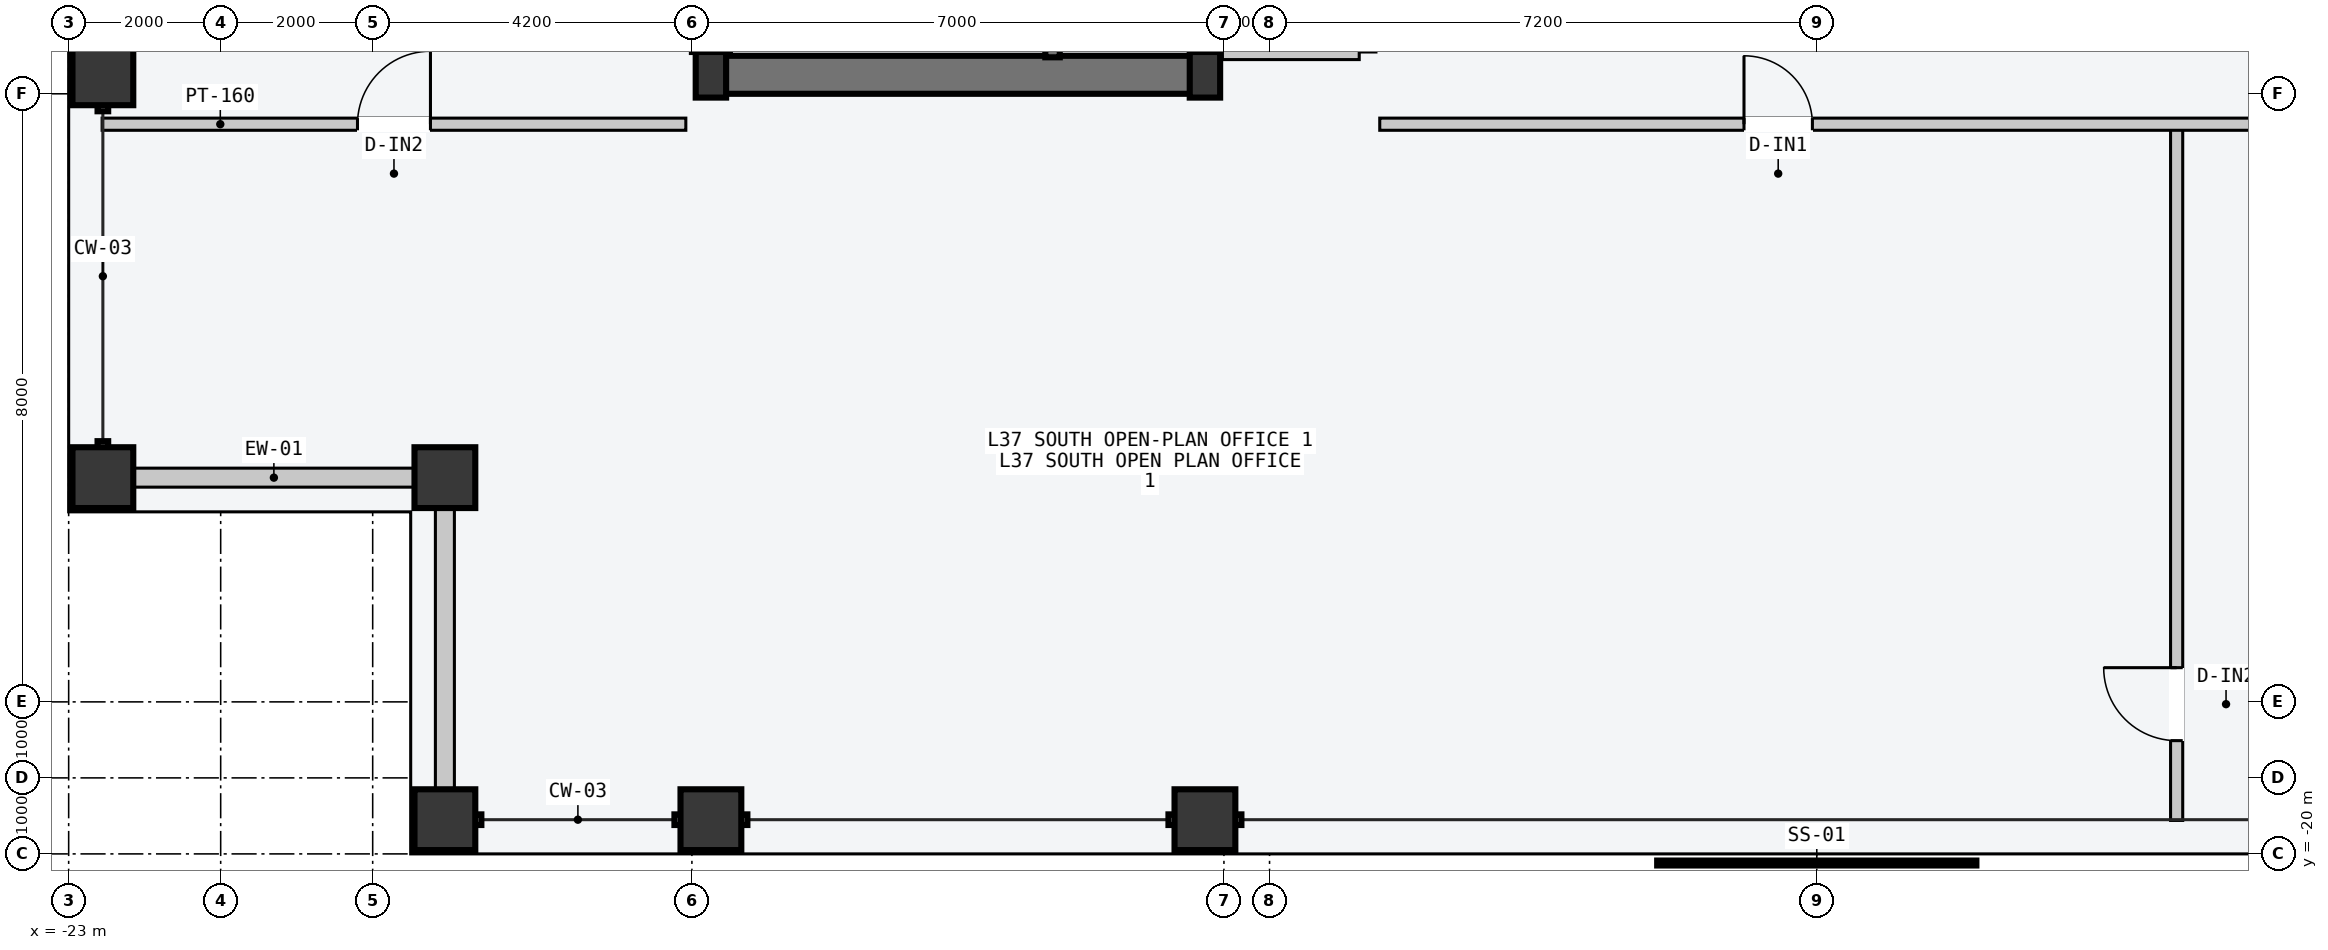
"""IFC4 building model, lengths in metres.
Left out: names, types, materials, properties, quantities, classifications, styles, units other than length and angle.
Written with IfcOpenShell. Run it as: python <this file> out.ifc"""

import sys

from ifc_helpers import new_model, si_unit, direction, frame, frame_2d, origin, origin_2d, place, context, subcontext, project, spatial, rectangle, hollow_rectangle, i_section, extrude, element, fill, save


model = new_model("IFC4")
c1 = context("Model", 3, precision=1e-05, world=origin(), true_north=direction((0.0, 1.0)))
c2 = subcontext(c1, "Body", "Model", "MODEL_VIEW")
j1 = project(units=[si_unit("LENGTHUNIT", "METRE"), si_unit("PLANEANGLEUNIT", "RADIAN")], contexts=[c1])
p1 = place(None, origin())
s1 = spatial("IfcSite", under=j1, at=p1, CompositionType="ELEMENT")
p2 = place(p1, origin())
s2 = spatial("IfcBuilding", under=s1, at=p2, CompositionType="ELEMENT")
p3 = place(p2, frame((0.0, 0.0, 142.2)))
s3 = spatial("IfcBuildingStorey", under=s2, at=p3, CompositionType="ELEMENT", Elevation=142.2)
p4 = place(p3, frame((-14.53, -9.75, -0.2), z_axis=(0.0, 0.0, 1.0), x_axis=(1.0, 0.0, 0.0)))
e1 = element("IfcWall", 1, at=p4, inside=s3, PredefinedType="SHEAR", context=c2, shape_type="SweptSolid", body=[
    extrude(rectangle(XDim=6.46, YDim=0.5, at=frame_2d((3.23, 0.0))), origin(), (0.0, 0.0, 1.0), 3.6),
])
for number, where, z_axis, x_axis in (
    (2, (-14.55, -9.75, 0.0), (0.0, 0.0, 1.0), (1.0, 0.0, 0.0)),
    (3, (-8.05, -9.75, 0.0), (0.0, 0.0, 1.0), (1.0, 0.0, 0.0)),
):
    element("IfcColumn", number, at=place(p3, frame(where, z_axis=z_axis, x_axis=x_axis)), inside=s3, PredefinedType="COLUMN", context=c2, shape_type="SweptSolid", body=[
        extrude(i_section(OverallWidth=0.4, OverallDepth=0.6, WebThickness=0.022, FlangeThickness=0.036, at=origin_2d()), origin(), (0.0, 0.0, 1.0), 3.6),
    ])
for number, where, z_axis, x_axis in (
    (4, (-18.05, -19.55, 0.0), (0.0, 0.0, 1.0), (1.0, 0.0, 0.0)),
    (5, (-14.55, -19.55, 0.0), (0.0, 0.0, 1.0), (1.0, 0.0, 0.0)),
    (6, (-8.05, -19.55, 0.0), (0.0, 0.0, 1.0), (1.0, 0.0, 0.0)),
    (7, (-22.55, -15.05, 0.0), (0.0, 0.0, 1.0), (0.0, 1.0, 0.0)),
    (8, (-22.55, -9.75, 0.0), (0.0, 0.0, 1.0), (0.0, 1.0, 0.0)),
    (9, (-18.05, -15.05, 0.0), (0.0, 0.0, 1.0), (1.0, 0.0, 0.0)),
):
    element("IfcColumn", number, at=place(p3, frame(where, z_axis=z_axis, x_axis=x_axis)), inside=s3, PredefinedType="COLUMN", context=c2, shape_type="SweptSolid", body=[
        extrude(hollow_rectangle(XDim=0.8, YDim=0.8, WallThickness=0.036, at=origin_2d()), origin(), (0.0, 0.0, 1.0), 3.6),
    ])
for number, where, z_axis, x_axis in (
    (10, (-22.14, -15.05, 0.0), (0.0, 0.0, 1.0), (1.0, 0.0, 0.0)),
    (11, (-18.05, -19.14, 0.0), (0.0, 0.0, 1.0), (0.0, 1.0, 0.0)),
):
    element("IfcWall", number, at=place(p3, frame(where, z_axis=z_axis, x_axis=x_axis)), inside=s3, PredefinedType="STANDARD", context=c2, shape_type="SweptSolid", body=[
        extrude(rectangle(XDim=3.68, YDim=0.25, at=frame_2d((1.84, 0.0))), origin(), (0.0, 0.0, 1.0), 2.75),
    ])
for number, where, z_axis, x_axis in (
    (12, (-8.045, -9.52, -0.2), (0.0, 0.0, 1.0), (0.0, 1.0, 0.0)),
    (13, (-10.055, -9.52, -0.2), (0.0, 0.0, 1.0), (0.0, 1.0, 0.0)),
):
    element("IfcWall", number, at=place(p3, frame(where, z_axis=z_axis, x_axis=x_axis)), inside=s3, PredefinedType="SOLIDWALL", context=c2, shape_type="SweptSolid", body=[
        extrude(rectangle(XDim=2.12, YDim=0.19, at=frame_2d((1.06, 0.0))), origin(), (0.0, 0.0, 1.0), 3.6),
    ])
p5 = place(p3, frame((-6.02, -9.45, 0.0), z_axis=(0.0, 0.0, 1.0), x_axis=(-1.0, 0.0, 0.0)))
e14 = element("IfcWall", 14, at=p5, inside=s3, PredefinedType="PARTITIONING", context=c2, shape_type="SweptSolid", body=[
    extrude(rectangle(XDim=1.8, YDim=0.2, at=frame_2d((0.9, 0.0))), origin(), (0.0, 0.0, 1.0), 3.4),
])
p6 = place(p3, frame((4.735, -19.56, 0.0), z_axis=(0.0, 0.0, 1.0), x_axis=(0.0, 1.0, 0.0)))
e15 = element("IfcWall", 15, at=p6, inside=s3, PredefinedType="PARTITIONING", context=c2, shape_type="SweptSolid", body=[
    extrude(rectangle(XDim=9.1, YDim=0.16, at=frame_2d((4.55, 0.0))), origin(), (0.0, 0.0, 1.0), 3.4),
])
p7 = place(p6, frame((1.05, 0.0, 0.0)))
e16 = element("IfcOpeningElement", 16, at=p7, cuts=e15, PredefinedType="OPENING", context=c2, shape_type="SweptSolid", body=[
    extrude(rectangle(XDim=0.96, YDim=2.18, at=frame_2d((0.48, 1.09))), frame((0.0, 0.09, 0.0), z_axis=(0.0, -1.0, 0.0), x_axis=(1.0, 0.0, 0.0)), (0.0, 0.0, 1.0), 0.18),
])
p8 = place(p3, frame((-5.75, -10.4, 0.0), z_axis=(0.0, 0.0, 1.0), x_axis=(1.0, 0.0, 0.0)))
e17 = element("IfcWall", 17, at=p8, inside=s3, PredefinedType="PARTITIONING", context=c2, shape_type="SweptSolid", body=[
    extrude(rectangle(XDim=11.5, YDim=0.16, at=frame_2d((5.75, 0.0))), origin(), (0.0, 0.0, 1.0), 3.4),
])
p9 = place(p8, frame((4.792, 0.0, 0.0)))
e18 = element("IfcOpeningElement", 18, at=p9, cuts=e17, PredefinedType="OPENING", context=c2, shape_type="SweptSolid", body=[
    extrude(rectangle(XDim=0.9, YDim=2.15, at=frame_2d((0.45, 1.075))), frame((0.0, 0.09, 0.0), z_axis=(0.0, -1.0, 0.0), x_axis=(1.0, 0.0, 0.0)), (0.0, 0.0, 1.0), 0.18),
])
p10 = place(p3, frame((-22.56, -10.4, 0.0), z_axis=(0.0, 0.0, 1.0), x_axis=(1.0, 0.0, 0.0)))
e19 = element("IfcWall", 19, at=p10, inside=s3, PredefinedType="PARTITIONING", context=c2, shape_type="SweptSolid", body=[
    extrude(rectangle(XDim=7.68, YDim=0.16, at=frame_2d((3.84, 0.0))), origin(), (0.0, 0.0, 1.0), 3.4),
])
p11 = place(p10, frame((3.36, 0.0, 0.0)))
e20 = element("IfcOpeningElement", 20, at=p11, cuts=e19, PredefinedType="OPENING", context=c2, shape_type="SweptSolid", body=[
    extrude(rectangle(XDim=0.96, YDim=2.18, at=frame_2d((0.48, 1.09))), frame((0.0, 0.09, 0.0), z_axis=(0.0, -1.0, 0.0), x_axis=(1.0, 0.0, 0.0)), (0.0, 0.0, 1.0), 0.18),
])
p12 = place(p7, origin())
e21 = element("IfcDoor", 21, at=p12, inside=s3, OperationType="SINGLE_SWING_RIGHT", PredefinedType="DOOR", context=c2, shape_type="SweptSolid", body=[
    extrude(rectangle(XDim=0.96, YDim=2.18, at=frame_2d((0.48, 1.09))), frame((0.0, 0.025, 0.0), z_axis=(0.0, -1.0, 0.0), x_axis=(1.0, 0.0, 0.0)), (0.0, 0.0, 1.0), 0.05),
])
fill(e16, e21)
p13 = place(p9, origin())
e22 = element("IfcDoor", 22, at=p13, inside=s3, OperationType="SINGLE_SWING_LEFT", PredefinedType="DOOR", context=c2, shape_type="SweptSolid", body=[
    extrude(rectangle(XDim=0.9, YDim=2.15, at=frame_2d((0.45, 1.075))), frame((0.0, 0.025, 0.0), z_axis=(0.0, -1.0, 0.0), x_axis=(1.0, 0.0, 0.0)), (0.0, 0.0, 1.0), 0.05),
])
fill(e18, e22)
p14 = place(p11, origin())
e23 = element("IfcDoor", 23, at=p14, inside=s3, OperationType="SINGLE_SWING_RIGHT", PredefinedType="DOOR", context=c2, shape_type="SweptSolid", body=[
    extrude(rectangle(XDim=0.96, YDim=2.18, at=frame_2d((0.48, 1.09))), frame((0.0, 0.025, 0.0), z_axis=(0.0, -1.0, 0.0), x_axis=(1.0, 0.0, 0.0)), (0.0, 0.0, 1.0), 0.05),
])
fill(e20, e23)
save(model, sys.argv[1])
